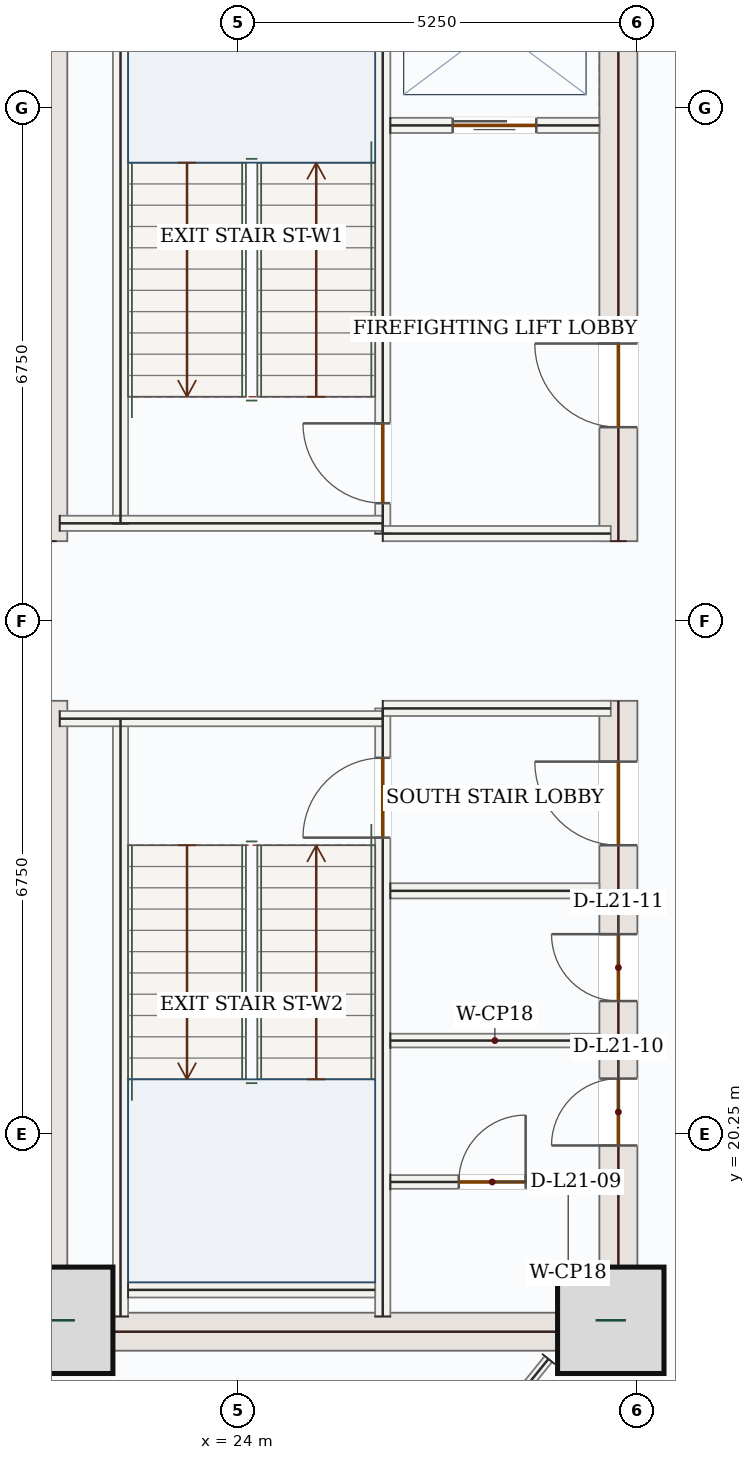
"""IFC4 building model, lengths in metres.
Left out: names, types, materials, properties, quantities, classifications, styles, units other than length and angle.
Written with IfcOpenShell. Run it as: python <this file> out.ifc"""

import sys

from ifc_helpers import new_model, si_unit, direction, frame, frame_2d, origin, origin_2d, place, context, subcontext, project, spatial, rectangle, extrude, source, transform, mapped, element, fill, save


model = new_model("IFC4")
c1 = context("Model", 3, precision=1e-05, world=origin(), true_north=direction((0.0, 1.0)))
c2 = subcontext(c1, "Body", "Model", "MODEL_VIEW")
j1 = project(units=[si_unit("LENGTHUNIT", "METRE"), si_unit("PLANEANGLEUNIT", "RADIAN")], contexts=[c1])
p1 = place(None, origin())
s1 = spatial("IfcSite", under=j1, at=p1, CompositionType="ELEMENT")
p2 = place(p1, origin())
s2 = spatial("IfcBuilding", under=s1, at=p2, CompositionType="ELEMENT")
p3 = place(p2, frame((0.0, 0.0, 96.3)))
s3 = spatial("IfcBuildingStorey", under=s2, at=p3, CompositionType="ELEMENT", Elevation=96.3)
m1 = source(origin(), c2, "Body", "SweptSolid", [
    extrude(rectangle(XDim=8.55, YDim=0.5, at=frame_2d((4.275, 0.0))), origin(), (0.0, 0.0, 1.0), 3.95),
])
for number, where, z_axis, x_axis in (
    (1, (21.5, 17.4, 0.0), (0.0, 0.0, 1.0), (0.0, 1.0, 0.0)),
    (2, (21.5, 28.05, 0.0), (0.0, 0.0, 1.0), (0.0, 1.0, 0.0)),
):
    element("IfcWall", number, at=place(p3, frame(where, z_axis=z_axis, x_axis=x_axis)), inside=s3, PredefinedType="SHEAR", context=c2, shape_type="MappedRepresentation", body=[
        mapped(m1, transform((0.0, 0.0, 0.0), x_axis=(1.0, 0.0, 0.0), y_axis=(0.0, 1.0, 0.0), z_axis=(0.0, 0.0, 1.0), scale=1.0)),
    ])
p4 = place(p3, frame((29.0, 17.4, 0.0), z_axis=(0.0, 0.0, 1.0), x_axis=(0.0, 1.0, 0.0)))
e3 = element("IfcWall", 3, at=p4, inside=s3, PredefinedType="SHEAR", context=c2, shape_type="SweptSolid", body=[
    extrude(rectangle(XDim=8.55, YDim=0.5, at=frame_2d((4.275, 0.0))), origin(), (0.0, 0.0, 1.0), 3.95),
])
p5 = place(p4, frame((6.65, 0.0, 0.0)))
e4 = element("IfcOpeningElement", 4, at=p5, cuts=e3, PredefinedType="OPENING", context=c2, shape_type="SweptSolid", body=[
    extrude(rectangle(XDim=1.1, YDim=2.2, at=frame_2d((0.55, 1.1))), frame((0.0, 0.26, 0.0), z_axis=(0.0, -1.0, 0.0), x_axis=(1.0, 0.0, 0.0)), (0.0, 0.0, 1.0), 0.52),
])
p6 = place(p4, frame((2.7, 0.0, 0.0)))
e5 = element("IfcOpeningElement", 5, at=p6, cuts=e3, PredefinedType="OPENING", context=c2, shape_type="SweptSolid", body=[
    extrude(rectangle(XDim=0.88, YDim=2.1, at=frame_2d((0.44, 1.05))), frame((0.0, 0.26, 0.0), z_axis=(0.0, -1.0, 0.0), x_axis=(1.0, 0.0, 0.0)), (0.0, 0.0, 1.0), 0.52),
])
p7 = place(p4, frame((4.6, 0.0, 0.0)))
e6 = element("IfcOpeningElement", 6, at=p7, cuts=e3, PredefinedType="OPENING", context=c2, shape_type="SweptSolid", body=[
    extrude(rectangle(XDim=0.88, YDim=2.1, at=frame_2d((0.44, 1.05))), frame((0.0, 0.26, 0.0), z_axis=(0.0, -1.0, 0.0), x_axis=(1.0, 0.0, 0.0)), (0.0, 0.0, 1.0), 0.52),
])
p8 = place(p3, frame((29.0, 28.05, 0.0), z_axis=(0.0, 0.0, 1.0), x_axis=(0.0, 1.0, 0.0)))
e7 = element("IfcWall", 7, at=p8, inside=s3, PredefinedType="SHEAR", context=c2, shape_type="SweptSolid", body=[
    extrude(rectangle(XDim=8.55, YDim=0.5, at=frame_2d((4.275, 0.0))), origin(), (0.0, 0.0, 1.0), 3.95),
])
p9 = place(p8, frame((1.5, 0.0, 0.0)))
e8 = element("IfcOpeningElement", 8, at=p9, cuts=e7, PredefinedType="OPENING", context=c2, shape_type="SweptSolid", body=[
    extrude(rectangle(XDim=1.1, YDim=2.2, at=frame_2d((0.55, 1.1))), frame((0.0, 0.26, 0.0), z_axis=(0.0, -1.0, 0.0), x_axis=(1.0, 0.0, 0.0)), (0.0, 0.0, 1.0), 0.52),
])
m2 = source(origin(), c2, "Body", "SweptSolid", [
    extrude(rectangle(XDim=7.0, YDim=0.5, at=frame_2d((3.5, 0.0))), origin(), (0.0, 0.0, 1.0), 3.95),
])
p10 = place(p3, frame((21.75, 17.65, 0.0), z_axis=(0.0, 0.0, 1.0), x_axis=(1.0, 0.0, 0.0)))
e9 = element("IfcWall", 9, at=p10, inside=s3, PredefinedType="SHEAR", context=c2, shape_type="MappedRepresentation", body=[
    mapped(m2, transform((0.0, 0.0, 0.0), x_axis=(1.0, 0.0, 0.0), y_axis=(0.0, 1.0, 0.0), z_axis=(0.0, 0.0, 1.0), scale=1.0)),
])
m3 = source(origin(), c2, "Body", "SweptSolid", [
    extrude(rectangle(XDim=1.4, YDim=1.4, at=origin_2d()), origin(), (0.0, 0.0, 1.0), 4.2),
])
for number, where, z_axis, x_axis in (
    (10, (21.65, 17.8, 0.0), (0.0, 0.0, 1.0), (1.0, 0.0, 0.0)),
    (11, (28.9, 17.8, 0.0), (0.0, 0.0, 1.0), (1.0, 0.0, 0.0)),
):
    element("IfcColumn", number, at=place(p3, frame(where, z_axis=z_axis, x_axis=x_axis)), inside=s3, PredefinedType="COLUMN", context=c2, shape_type="MappedRepresentation", body=[
        mapped(m3, transform((0.0, 0.0, 0.0), x_axis=(1.0, 0.0, 0.0), y_axis=(0.0, 1.0, 0.0), z_axis=(0.0, 0.0, 1.0), scale=1.0)),
    ])
m4 = source(origin(), c2, "Body", "SweptSolid", [
    extrude(rectangle(XDim=5.258, YDim=0.32, at=frame_2d((2.629, 0.0))), origin(), (0.0, 0.0, 1.0), 3.95),
])
p11 = place(p3, frame((22.658, 14.74, 0.0), z_axis=(0.0, 0.0, 1.0), x_axis=(-0.707106781187, 0.707106781187, 0.0)))
e12 = element("IfcWall", 12, at=p11, inside=s3, PredefinedType="SOLIDWALL", context=c2, shape_type="MappedRepresentation", body=[
    mapped(m4, transform((0.0, 0.0, 0.0), x_axis=(1.0, 0.0, 0.0), y_axis=(0.0, 1.0, 0.0), z_axis=(0.0, 0.0, 1.0), scale=1.0)),
])
m5 = source(origin(), c2, "Body", "SweptSolid", [
    extrude(rectangle(XDim=7.87, YDim=0.2, at=frame_2d((3.935, 0.0))), origin(), (0.0, 0.0, 1.0), 3.95),
])
for number, where, z_axis, x_axis in (
    (13, (22.45, 17.85, 0.0), (0.0, 0.0, 1.0), (0.0, 1.0, 0.0)),
    (14, (22.45, 28.28, 0.0), (0.0, 0.0, 1.0), (0.0, 1.0, 0.0)),
):
    element("IfcWall", number, at=place(p3, frame(where, z_axis=z_axis, x_axis=x_axis)), inside=s3, PredefinedType="SOLIDWALL", context=c2, shape_type="MappedRepresentation", body=[
        mapped(m5, transform((0.0, 0.0, 0.0), x_axis=(1.0, 0.0, 0.0), y_axis=(0.0, 1.0, 0.0), z_axis=(0.0, 0.0, 1.0), scale=1.0)),
    ])
p12 = place(p3, frame((25.9, 17.85, 0.0), z_axis=(0.0, 0.0, 1.0), x_axis=(0.0, 1.0, 0.0)))
e15 = element("IfcWall", 15, at=p12, inside=s3, PredefinedType="SOLIDWALL", context=c2, shape_type="SweptSolid", body=[
    extrude(rectangle(XDim=8.0, YDim=0.2, at=frame_2d((4.0, 0.0))), origin(), (0.0, 0.0, 1.0), 3.95),
])
p13 = place(p12, frame((6.3, 0.0, 0.0)))
e16 = element("IfcOpeningElement", 16, at=p13, cuts=e15, PredefinedType="OPENING", context=c2, shape_type="SweptSolid", body=[
    extrude(rectangle(XDim=1.05, YDim=2.15, at=frame_2d((0.525, 1.075))), frame((0.0, 0.11, 0.0), z_axis=(0.0, -1.0, 0.0), x_axis=(1.0, 0.0, 0.0)), (0.0, 0.0, 1.0), 0.22),
])
p14 = place(p3, frame((25.9, 28.15, 0.0), z_axis=(0.0, 0.0, 1.0), x_axis=(0.0, 1.0, 0.0)))
e17 = element("IfcWall", 17, at=p14, inside=s3, PredefinedType="SOLIDWALL", context=c2, shape_type="SweptSolid", body=[
    extrude(rectangle(XDim=8.0, YDim=0.2, at=frame_2d((4.0, 0.0))), origin(), (0.0, 0.0, 1.0), 3.95),
])
p15 = place(p14, frame((0.4, 0.0, 0.0)))
e18 = element("IfcOpeningElement", 18, at=p15, cuts=e17, PredefinedType="OPENING", context=c2, shape_type="SweptSolid", body=[
    extrude(rectangle(XDim=1.05, YDim=2.15, at=frame_2d((0.525, 1.075))), frame((0.0, 0.11, 0.0), z_axis=(0.0, -1.0, 0.0), x_axis=(1.0, 0.0, 0.0)), (0.0, 0.0, 1.0), 0.22),
])
m6 = source(origin(), c2, "Body", "SweptSolid", [
    extrude(rectangle(XDim=4.25, YDim=0.2, at=frame_2d((2.125, 0.0))), origin(), (0.0, 0.0, 1.0), 3.95),
])
p16 = place(p3, frame((21.65, 25.715, 0.0), z_axis=(0.0, 0.0, 1.0), x_axis=(1.0, 0.0, 0.0)))
e19 = element("IfcWall", 19, at=p16, inside=s3, PredefinedType="SOLIDWALL", context=c2, shape_type="MappedRepresentation", body=[
    mapped(m6, transform((0.0, 0.0, 0.0), x_axis=(1.0, 0.0, 0.0), y_axis=(0.0, 1.0, 0.0), z_axis=(0.0, 0.0, 1.0), scale=1.0)),
])
m7 = source(origin(), c2, "Body", "SweptSolid", [
    extrude(rectangle(XDim=3.0, YDim=0.2, at=frame_2d((1.5, 0.0))), origin(), (0.0, 0.0, 1.0), 3.95),
])
p17 = place(p3, frame((25.9, 25.85, 0.0), z_axis=(0.0, 0.0, 1.0), x_axis=(1.0, 0.0, 0.0)))
e20 = element("IfcWall", 20, at=p17, inside=s3, PredefinedType="SOLIDWALL", context=c2, shape_type="MappedRepresentation", body=[
    mapped(m7, transform((0.0, 0.0, 0.0), x_axis=(1.0, 0.0, 0.0), y_axis=(0.0, 1.0, 0.0), z_axis=(0.0, 0.0, 1.0), scale=1.0)),
])
p18 = place(p3, frame((21.65, 28.285, 0.0), z_axis=(0.0, 0.0, 1.0), x_axis=(1.0, 0.0, 0.0)))
e21 = element("IfcWall", 21, at=p18, inside=s3, PredefinedType="SOLIDWALL", context=c2, shape_type="MappedRepresentation", body=[
    mapped(m6, transform((0.0, 0.0, 0.0), x_axis=(1.0, 0.0, 0.0), y_axis=(0.0, 1.0, 0.0), z_axis=(0.0, 0.0, 1.0), scale=1.0)),
])
p19 = place(p3, frame((25.9, 28.15, 0.0), z_axis=(0.0, 0.0, 1.0), x_axis=(1.0, 0.0, 0.0)))
e22 = element("IfcWall", 22, at=p19, inside=s3, PredefinedType="SOLIDWALL", context=c2, shape_type="MappedRepresentation", body=[
    mapped(m7, transform((0.0, 0.0, 0.0), x_axis=(1.0, 0.0, 0.0), y_axis=(0.0, 1.0, 0.0), z_axis=(0.0, 0.0, 1.0), scale=1.0)),
])
m8 = source(origin(), c2, "Body", "SweptSolid", [
    extrude(rectangle(XDim=3.25, YDim=0.2, at=frame_2d((1.625, 0.0))), origin(), (0.0, 0.0, 1.0), 3.95),
])
p20 = place(p3, frame((22.55, 18.2, 0.0), z_axis=(0.0, 0.0, 1.0), x_axis=(1.0, 0.0, 0.0)))
e23 = element("IfcWall", 23, at=p20, inside=s3, PredefinedType="SOLIDWALL", context=c2, shape_type="MappedRepresentation", body=[
    mapped(m8, transform((0.0, 0.0, 0.0), x_axis=(1.0, 0.0, 0.0), y_axis=(0.0, 1.0, 0.0), z_axis=(0.0, 0.0, 1.0), scale=1.0)),
])
p21 = place(p3, frame((26.0, 33.52, 0.0), z_axis=(0.0, 0.0, 1.0), x_axis=(1.0, 0.0, 0.0)))
e24 = element("IfcWall", 24, at=p21, inside=s3, PredefinedType="SOLIDWALL", context=c2, shape_type="SweptSolid", body=[
    extrude(rectangle(XDim=2.75, YDim=0.2, at=frame_2d((1.375, 0.0))), origin(), (0.0, 0.0, 1.0), 3.95),
])
p22 = place(p21, frame((0.82, 0.0, 0.0)))
e25 = element("IfcOpeningElement", 25, at=p22, cuts=e24, PredefinedType="OPENING", context=c2, shape_type="SweptSolid", body=[
    extrude(rectangle(XDim=1.1, YDim=2.15, at=frame_2d((0.55, 1.075))), frame((0.0, 0.11, 0.0), z_axis=(0.0, -1.0, 0.0), x_axis=(1.0, 0.0, 0.0)), (0.0, 0.0, 1.0), 0.22),
])
m9 = source(origin(), c2, "Body", "SweptSolid", [
    extrude(rectangle(XDim=2.75, YDim=0.2, at=frame_2d((1.375, 0.0))), origin(), (0.0, 0.0, 1.0), 3.95),
])
p23 = place(p3, frame((26.0, 23.45, 0.0), z_axis=(0.0, 0.0, 1.0), x_axis=(1.0, 0.0, 0.0)))
e26 = element("IfcWall", 26, at=p23, inside=s3, PredefinedType="SOLIDWALL", context=c2, shape_type="MappedRepresentation", body=[
    mapped(m9, transform((0.0, 0.0, 0.0), x_axis=(1.0, 0.0, 0.0), y_axis=(0.0, 1.0, 0.0), z_axis=(0.0, 0.0, 1.0), scale=1.0)),
])
p24 = place(p3, frame((26.0, 19.62, 0.0), z_axis=(0.0, 0.0, 1.0), x_axis=(1.0, 0.0, 0.0)))
e27 = element("IfcWall", 27, at=p24, inside=s3, PredefinedType="PARTITIONING", context=c2, shape_type="SweptSolid", body=[
    extrude(rectangle(XDim=2.75, YDim=0.18, at=frame_2d((1.375, 0.0))), origin(), (0.0, 0.0, 1.0), 3.95),
])
p25 = place(p24, frame((0.9, 0.0, 0.0)))
e28 = element("IfcOpeningElement", 28, at=p25, cuts=e27, PredefinedType="OPENING", context=c2, shape_type="SweptSolid", body=[
    extrude(rectangle(XDim=0.88, YDim=2.1, at=frame_2d((0.44, 1.05))), frame((0.0, 0.1, 0.0), z_axis=(0.0, -1.0, 0.0), x_axis=(1.0, 0.0, 0.0)), (0.0, 0.0, 1.0), 0.2),
])
m10 = source(origin(), c2, "Body", "SweptSolid", [
    extrude(rectangle(XDim=2.75, YDim=0.18, at=frame_2d((1.375, 0.0))), origin(), (0.0, 0.0, 1.0), 3.95),
])
p26 = place(p3, frame((26.0, 21.48, 0.0), z_axis=(0.0, 0.0, 1.0), x_axis=(1.0, 0.0, 0.0)))
e29 = element("IfcWall", 29, at=p26, inside=s3, PredefinedType="PARTITIONING", context=c2, shape_type="MappedRepresentation", body=[
    mapped(m10, transform((0.0, 0.0, 0.0), x_axis=(1.0, 0.0, 0.0), y_axis=(0.0, 1.0, 0.0), z_axis=(0.0, 0.0, 1.0), scale=1.0)),
])
m11 = source(origin(), c2, "Body", "SweptSolid", [
    extrude(rectangle(XDim=3.072, YDim=0.125, at=frame_2d((1.536, 0.0))), origin(), (0.0, 0.0, 1.0), 3.95),
])
p27 = place(p3, frame((28.08, 17.291, 0.0), z_axis=(0.0, 0.0, 1.0), x_axis=(-0.629760486176, -0.776789373029, 0.0)))
e30 = element("IfcWall", 30, at=p27, inside=s3, PredefinedType="PARTITIONING", context=c2, shape_type="MappedRepresentation", body=[
    mapped(m11, transform((0.0, 0.0, 0.0), x_axis=(1.0, 0.0, 0.0), y_axis=(0.0, 1.0, 0.0), z_axis=(0.0, 0.0, 1.0), scale=1.0)),
])
m12 = source(origin(), c2, "Body", "SweptSolid", [
    extrude(rectangle(XDim=1.05, YDim=2.15, at=frame_2d((0.525, 1.075))), frame((0.0, 0.025, 0.0), z_axis=(0.0, -1.0, 0.0), x_axis=(1.0, 0.0, 0.0)), (0.0, 0.0, 1.0), 0.05),
])
p28 = place(p15, origin())
e31 = element("IfcDoor", 31, at=p28, inside=s3, OperationType="SINGLE_SWING_RIGHT", PredefinedType="DOOR", context=c2, shape_type="MappedRepresentation", body=[
    mapped(m12, transform((0.0, 0.0, 0.0), x_axis=(1.0, 0.0, 0.0), y_axis=(0.0, 1.0, 0.0), z_axis=(0.0, 0.0, 1.0), scale=1.0)),
])
fill(e18, e31)
p29 = place(p13, origin())
e32 = element("IfcDoor", 32, at=p29, inside=s3, OperationType="SINGLE_SWING_LEFT", PredefinedType="DOOR", context=c2, shape_type="MappedRepresentation", body=[
    mapped(m12, transform((0.0, 0.0, 0.0), x_axis=(1.0, 0.0, 0.0), y_axis=(0.0, 1.0, 0.0), z_axis=(0.0, 0.0, 1.0), scale=1.0)),
])
fill(e16, e32)
m13 = source(origin(), c2, "Body", "SweptSolid", [
    extrude(rectangle(XDim=1.1, YDim=2.15, at=frame_2d((0.55, 1.075))), frame((0.0, 0.025, 0.0), z_axis=(0.0, -1.0, 0.0), x_axis=(1.0, 0.0, 0.0)), (0.0, 0.0, 1.0), 0.05),
])
p30 = place(p22, origin())
e33 = element("IfcDoor", 33, at=p30, inside=s3, OperationType="DOUBLE_DOOR_SLIDING", PredefinedType="DOOR", context=c2, shape_type="MappedRepresentation", body=[
    mapped(m13, transform((0.0, 0.0, 0.0), x_axis=(1.0, 0.0, 0.0), y_axis=(0.0, 1.0, 0.0), z_axis=(0.0, 0.0, 1.0), scale=1.0)),
])
fill(e25, e33)
m14 = source(origin(), c2, "Body", "SweptSolid", [
    extrude(rectangle(XDim=1.1, YDim=2.2, at=frame_2d((0.55, 1.1))), frame((0.0, 0.025, 0.0), z_axis=(0.0, -1.0, 0.0), x_axis=(1.0, 0.0, 0.0)), (0.0, 0.0, 1.0), 0.05),
])
p31 = place(p9, origin())
e34 = element("IfcDoor", 34, at=p31, inside=s3, OperationType="SINGLE_SWING_RIGHT", PredefinedType="DOOR", context=c2, shape_type="MappedRepresentation", body=[
    mapped(m14, transform((0.0, 0.0, 0.0), x_axis=(1.0, 0.0, 0.0), y_axis=(0.0, 1.0, 0.0), z_axis=(0.0, 0.0, 1.0), scale=1.0)),
])
fill(e8, e34)
p32 = place(p5, origin())
e35 = element("IfcDoor", 35, at=p32, inside=s3, OperationType="SINGLE_SWING_RIGHT", PredefinedType="DOOR", context=c2, shape_type="MappedRepresentation", body=[
    mapped(m14, transform((0.0, 0.0, 0.0), x_axis=(1.0, 0.0, 0.0), y_axis=(0.0, 1.0, 0.0), z_axis=(0.0, 0.0, 1.0), scale=1.0)),
])
fill(e4, e35)
m15 = source(origin(), c2, "Body", "SweptSolid", [
    extrude(rectangle(XDim=0.88, YDim=2.1, at=frame_2d((0.44, 1.05))), frame((0.0, 0.025, 0.0), z_axis=(0.0, -1.0, 0.0), x_axis=(1.0, 0.0, 0.0)), (0.0, 0.0, 1.0), 0.05),
])
p33 = place(p25, origin())
e36 = element("IfcDoor", 36, at=p33, inside=s3, OperationType="SINGLE_SWING_RIGHT", PredefinedType="DOOR", context=c2, shape_type="MappedRepresentation", body=[
    mapped(m15, transform((0.0, 0.0, 0.0), x_axis=(1.0, 0.0, 0.0), y_axis=(0.0, 1.0, 0.0), z_axis=(0.0, 0.0, 1.0), scale=1.0)),
])
fill(e28, e36)
p34 = place(p6, origin())
e37 = element("IfcDoor", 37, at=p34, inside=s3, OperationType="SINGLE_SWING_LEFT", PredefinedType="DOOR", context=c2, shape_type="MappedRepresentation", body=[
    mapped(m15, transform((0.0, 0.0, 0.0), x_axis=(1.0, 0.0, 0.0), y_axis=(0.0, 1.0, 0.0), z_axis=(0.0, 0.0, 1.0), scale=1.0)),
])
fill(e5, e37)
p35 = place(p7, origin())
e38 = element("IfcDoor", 38, at=p35, inside=s3, OperationType="SINGLE_SWING_RIGHT", PredefinedType="DOOR", context=c2, shape_type="MappedRepresentation", body=[
    mapped(m15, transform((0.0, 0.0, 0.0), x_axis=(1.0, 0.0, 0.0), y_axis=(0.0, 1.0, 0.0), z_axis=(0.0, 0.0, 1.0), scale=1.0)),
])
fill(e6, e38)
save(model, sys.argv[1])
